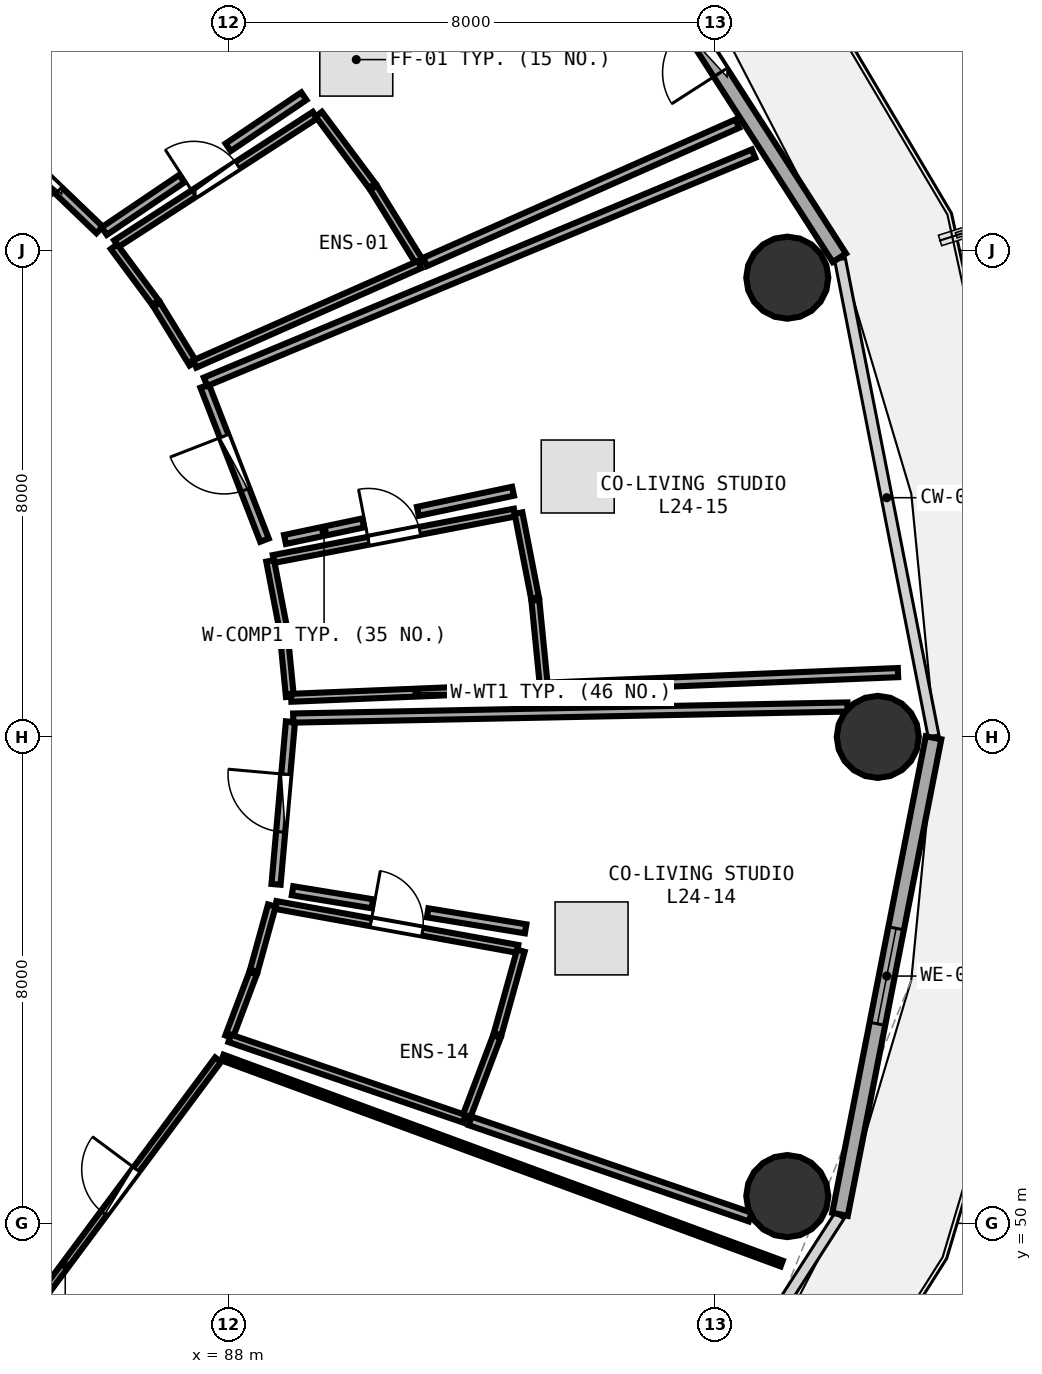
"""IFC4 building model, lengths in metres.
Left out: names, types, materials, properties, quantities, classifications, styles, units other than length and angle.
Written with IfcOpenShell. Run it as: python <this file> out.ifc"""

import sys

from ifc_helpers import new_model, si_unit, direction, frame, frame_2d, origin, origin_2d, place, context, subcontext, project, spatial, rectangle, circle, extrude, element, fill, save


model = new_model("IFC4")
c1 = context("Model", 3, precision=1e-05, world=origin(), true_north=direction((0.0, 1.0)))
c2 = subcontext(c1, "Body", "Model", "MODEL_VIEW")
j1 = project(units=[si_unit("LENGTHUNIT", "METRE"), si_unit("PLANEANGLEUNIT", "RADIAN")], contexts=[c1])
p1 = place(None, origin())
s1 = spatial("IfcSite", under=j1, at=p1, CompositionType="ELEMENT")
p2 = place(p1, origin())
s2 = spatial("IfcBuilding", under=s1, at=p2, CompositionType="ELEMENT")
p3 = place(p2, frame((0.0, 0.0, 95.1)))
s3 = spatial("IfcBuildingStorey", under=s2, at=p3, CompositionType="ELEMENT", Elevation=95.1)
for number, where, z_axis, x_axis in (
    (1, (98.68, 58.0, 0.0), (0.0, 0.0, 1.0), (1.0, 0.0, 0.0)),
    (2, (97.192, 65.552, 0.0), (0.0, 0.0, 1.0), (1.0, 0.0, 0.0)),
    (3, (97.192, 50.448, 0.0), (0.0, 0.0, 1.0), (1.0, 0.0, 0.0)),
):
    element("IfcColumn", number, at=place(p3, frame(where, z_axis=z_axis, x_axis=x_axis)), inside=s3, PredefinedType="COLUMN", context=c2, shape_type="SweptSolid", body=[
        extrude(circle(Radius=0.675, at=origin_2d()), origin(), (0.0, 0.0, 1.0), 3.75),
    ])
p4 = place(p3, frame((98.048, 65.879, 0.0), z_axis=(0.0, 0.0, 1.0), x_axis=(-0.540620528459, 0.841266571432, 0.0)))
e4 = element("IfcWall", 4, at=p4, inside=s3, PredefinedType="SOLIDWALL", context=c2, shape_type="SweptSolid", body=[
    extrude(rectangle(XDim=8.193, YDim=0.26, at=frame_2d((4.096, 0.0))), origin(), (0.0, 0.0, 1.0), 3.475),
])
p5 = place(p4, frame((3.621, 0.0, 0.0)))
e5 = element("IfcOpeningElement", 5, at=p5, cuts=e4, PredefinedType="OPENING", context=c2, shape_type="SweptSolid", body=[
    extrude(rectangle(XDim=0.95, YDim=2.1, at=frame_2d((0.475, 1.05))), frame((0.0, 0.14, 0.0), z_axis=(0.0, -1.0, 0.0), x_axis=(1.0, 0.0, 0.0)), (0.0, 0.0, 1.0), 0.28),
])
p6 = place(p4, frame((4.921, 0.0, 0.85)))
e6 = element("IfcOpeningElement", 6, at=p6, cuts=e4, PredefinedType="OPENING", context=c2, shape_type="SweptSolid", body=[
    extrude(rectangle(XDim=1.2, YDim=1.45, at=frame_2d((0.6, 0.725))), frame((0.0, 0.14, 0.0), z_axis=(0.0, -1.0, 0.0), x_axis=(1.0, 0.0, 0.0)), (0.0, 0.0, 1.0), 0.28),
])
p7 = place(p3, frame((98.059, 50.148, 0.0), z_axis=(0.0, 0.0, 1.0), x_axis=(0.192581843632, 0.981280914674, 0.0)))
e7 = element("IfcWall", 7, at=p7, inside=s3, PredefinedType="SOLIDWALL", context=c2, shape_type="SweptSolid", body=[
    extrude(rectangle(XDim=7.987, YDim=0.26, at=frame_2d((3.993, 0.0))), origin(), (0.0, 0.0, 1.0), 3.475),
])
p8 = place(p7, frame((3.193, 0.0, 0.85)))
e8 = element("IfcOpeningElement", 8, at=p8, cuts=e7, PredefinedType="OPENING", context=c2, shape_type="SweptSolid", body=[
    extrude(rectangle(XDim=1.6, YDim=1.45, at=frame_2d((0.8, 0.725))), frame((0.0, 0.14, 0.0), z_axis=(0.0, -1.0, 0.0), x_axis=(1.0, 0.0, 0.0)), (0.0, 0.0, 1.0), 0.28),
])
p9 = place(p3, frame((86.156, 66.111, 0.0), z_axis=(0.0, 0.0, 1.0), x_axis=(0.839597088747, 0.543209654339, 0.0)))
e9 = element("IfcWall", 9, at=p9, inside=s3, PredefinedType="PLUMBINGWALL", context=c2, shape_type="SweptSolid", body=[
    extrude(rectangle(XDim=3.891, YDim=0.13, at=frame_2d((1.946, 0.0))), origin(), (0.0, 0.0, 1.0), 3.175),
])
p10 = place(p9, frame((1.516, 0.0, 0.0)))
e10 = element("IfcOpeningElement", 10, at=p10, cuts=e9, PredefinedType="OPENING", context=c2, shape_type="SweptSolid", body=[
    extrude(rectangle(XDim=0.86, YDim=2.05, at=frame_2d((0.43, 1.025))), frame((0.0, 0.075, 0.0), z_axis=(0.0, -1.0, 0.0), x_axis=(1.0, 0.0, 0.0)), (0.0, 0.0, 1.0), 0.15),
])
p11 = place(p3, frame((85.882, 66.337, 0.0), z_axis=(0.0, 0.0, 1.0), x_axis=(-0.721698326825, 0.692207718144, 0.0)))
e11 = element("IfcWall", 11, at=p11, inside=s3, PredefinedType="PARTITIONING", context=c2, shape_type="SweptSolid", body=[
    extrude(rectangle(XDim=2.823, YDim=0.15, at=frame_2d((1.412, 0.0))), origin(), (0.0, 0.0, 1.0), 2.925),
])
p12 = place(p11, frame((0.936, 0.0, 0.0)))
e12 = element("IfcOpeningElement", 12, at=p12, cuts=e11, PredefinedType="OPENING", context=c2, shape_type="SweptSolid", body=[
    extrude(rectangle(XDim=0.95, YDim=2.08, at=frame_2d((0.475, 1.04))), frame((0.0, 0.085, 0.0), z_axis=(0.0, -1.0, 0.0), x_axis=(1.0, 0.0, 0.0)), (0.0, 0.0, 1.0), 0.17),
])
p13 = place(p3, frame((84.608, 48.36, 0.0), z_axis=(0.0, 0.0, 1.0), x_axis=(0.596833425992, 0.802365167251, 0.0)))
e13 = element("IfcWall", 13, at=p13, inside=s3, PredefinedType="PARTITIONING", context=c2, shape_type="SweptSolid", body=[
    extrude(rectangle(XDim=5.399, YDim=0.12, at=frame_2d((2.699, 0.0))), origin(), (0.0, 0.0, 1.0), 2.925),
])
p14 = place(p13, frame((2.249, 0.0, 0.0)))
e14 = element("IfcOpeningElement", 14, at=p14, cuts=e13, PredefinedType="OPENING", context=c2, shape_type="SweptSolid", body=[
    extrude(rectangle(XDim=0.9, YDim=2.08, at=frame_2d((0.45, 1.04))), frame((0.0, 0.07, 0.0), z_axis=(0.0, -1.0, 0.0), x_axis=(1.0, 0.0, 0.0)), (0.0, 0.0, 1.0), 0.14),
])
p15 = place(p3, frame((88.779, 55.235, 0.0), z_axis=(0.0, 0.0, 1.0), x_axis=(0.983931701878, -0.178545249279, 0.0)))
e15 = element("IfcWall", 15, at=p15, inside=s3, PredefinedType="PLUMBINGWALL", context=c2, shape_type="SweptSolid", body=[
    extrude(rectangle(XDim=4.042, YDim=0.13, at=frame_2d((2.021, 0.0))), origin(), (0.0, 0.0, 1.0), 3.175),
])
p16 = place(p15, frame((1.591, 0.0, 0.0)))
e16 = element("IfcOpeningElement", 16, at=p16, cuts=e15, PredefinedType="OPENING", context=c2, shape_type="SweptSolid", body=[
    extrude(rectangle(XDim=0.86, YDim=2.05, at=frame_2d((0.43, 1.025))), frame((0.0, 0.075, 0.0), z_axis=(0.0, -1.0, 0.0), x_axis=(1.0, 0.0, 0.0)), (0.0, 0.0, 1.0), 0.15),
])
p17 = place(p3, frame((88.783, 55.575, 0.0), z_axis=(0.0, 0.0, 1.0), x_axis=(0.088469625327, 0.996078875087, 0.0)))
e17 = element("IfcWall", 17, at=p17, inside=s3, PredefinedType="PARTITIONING", context=c2, shape_type="SweptSolid", body=[
    extrude(rectangle(XDim=2.685, YDim=0.15, at=frame_2d((1.343, 0.0))), origin(), (0.0, 0.0, 1.0), 2.925),
])
p18 = place(p17, frame((0.867, 0.0, 0.0)))
e18 = element("IfcOpeningElement", 18, at=p18, cuts=e17, PredefinedType="OPENING", context=c2, shape_type="SweptSolid", body=[
    extrude(rectangle(XDim=0.95, YDim=2.08, at=frame_2d((0.475, 1.04))), frame((0.0, 0.085, 0.0), z_axis=(0.0, -1.0, 0.0), x_axis=(1.0, 0.0, 0.0)), (0.0, 0.0, 1.0), 0.17),
])
p19 = place(p3, frame((88.742, 60.925, 0.0), z_axis=(0.0, 0.0, 1.0), x_axis=(0.981973232987, 0.189020024595, 0.0)))
e19 = element("IfcWall", 19, at=p19, inside=s3, PredefinedType="PLUMBINGWALL", context=c2, shape_type="SweptSolid", body=[
    extrude(rectangle(XDim=4.039, YDim=0.13, at=frame_2d((2.02, 0.0))), origin(), (0.0, 0.0, 1.0), 3.175),
])
p20 = place(p19, frame((1.59, 0.0, 0.0)))
e20 = element("IfcOpeningElement", 20, at=p20, cuts=e19, PredefinedType="OPENING", context=c2, shape_type="SweptSolid", body=[
    extrude(rectangle(XDim=0.86, YDim=2.05, at=frame_2d((0.43, 1.025))), frame((0.0, 0.075, 0.0), z_axis=(0.0, -1.0, 0.0), x_axis=(1.0, 0.0, 0.0)), (0.0, 0.0, 1.0), 0.15),
])
p21 = place(p3, frame((88.593, 61.236, 0.0), z_axis=(0.0, 0.0, 1.0), x_axis=(-0.361969309841, 0.93219001214, 0.0)))
e21 = element("IfcWall", 21, at=p21, inside=s3, PredefinedType="PARTITIONING", context=c2, shape_type="SweptSolid", body=[
    extrude(rectangle(XDim=2.718, YDim=0.15, at=frame_2d((1.359, 0.0))), origin(), (0.0, 0.0, 1.0), 3.235),
])
p22 = place(p21, frame((0.884, 0.0, 0.0)))
e22 = element("IfcOpeningElement", 22, at=p22, cuts=e21, PredefinedType="OPENING", context=c2, shape_type="SweptSolid", body=[
    extrude(rectangle(XDim=0.95, YDim=2.08, at=frame_2d((0.475, 1.04))), frame((0.0, 0.085, 0.0), z_axis=(0.0, -1.0, 0.0), x_axis=(1.0, 0.0, 0.0)), (0.0, 0.0, 1.0), 0.17),
])
p23 = place(p3, frame((87.417, 64.141, 0.0), z_axis=(0.0, 0.0, 1.0), x_axis=(-0.52310141153, 0.852270446077, 0.0)))
e23 = element("IfcWall", 23, at=p23, inside=s3, PredefinedType="PLUMBINGWALL", context=c2, shape_type="SweptSolid", body=[
    extrude(rectangle(XDim=1.135, YDim=0.13, at=frame_2d((0.568, 0.0))), origin(), (0.0, 0.0, 1.0), 2.925),
])
p24 = place(p3, frame((86.8, 65.142, 0.0), z_axis=(0.0, 0.0, 1.0), x_axis=(-0.595625136946, 0.803262532574, 0.0)))
e24 = element("IfcWall", 24, at=p24, inside=s3, PredefinedType="PLUMBINGWALL", context=c2, shape_type="SweptSolid", body=[
    extrude(rectangle(XDim=1.145, YDim=0.13, at=frame_2d((0.573, 0.0))), origin(), (0.0, 0.0, 1.0), 2.925),
])
p25 = place(p3, frame((89.486, 68.241, 0.0), z_axis=(0.0, 0.0, 1.0), x_axis=(0.598215175904, -0.801335512328, 0.0)))
e25 = element("IfcWall", 25, at=p25, inside=s3, PredefinedType="PLUMBINGWALL", context=c2, shape_type="SweptSolid", body=[
    extrude(rectangle(XDim=1.468, YDim=0.13, at=frame_2d((0.734, 0.0))), origin(), (0.0, 0.0, 1.0), 3.48),
])
p26 = place(p3, frame((90.386, 67.032, 0.0), z_axis=(0.0, 0.0, 1.0), x_axis=(0.525910281035, -0.850540049793, 0.0)))
e26 = element("IfcWall", 26, at=p26, inside=s3, PredefinedType="PLUMBINGWALL", context=c2, shape_type="SweptSolid", body=[
    extrude(rectangle(XDim=1.457, YDim=0.13, at=frame_2d((0.729, 0.0))), origin(), (0.0, 0.0, 1.0), 3.48),
])
p27 = place(p3, frame((91.145, 65.768, 0.0), z_axis=(0.0, 0.0, 1.0), x_axis=(-0.914586427441, -0.404390487946, 0.0)))
e27 = element("IfcWall", 27, at=p27, inside=s3, PredefinedType="PLUMBINGWALL", context=c2, shape_type="SweptSolid", body=[
    extrude(rectangle(XDim=4.045, YDim=0.13, at=frame_2d((2.022, 0.0))), origin(), (0.0, 0.0, 1.0), 2.925),
])
p28 = place(p3, frame((83.829, 68.362, 0.0), z_axis=(0.0, 0.0, 1.0), x_axis=(0.698749209364, 0.715366718833, 0.0)))
e28 = element("IfcWall", 28, at=p28, inside=s3, PredefinedType="PARTITIONING", context=c2, shape_type="SweptSolid", body=[
    extrude(rectangle(XDim=9.3, YDim=0.15, at=frame_2d((4.65, 0.0))), origin(), (0.0, 0.0, 1.0), 2.975),
])
p29 = place(p3, frame((96.369, 68.085, 0.0), z_axis=(0.0, 0.0, 1.0), x_axis=(-0.914319955381, -0.404992616219, 0.0)))
e29 = element("IfcWall", 29, at=p29, inside=s3, PredefinedType="PARTITIONING", context=c2, shape_type="SweptSolid", body=[
    extrude(rectangle(XDim=5.616, YDim=0.15, at=frame_2d((2.808, 0.0))), origin(), (0.0, 0.0, 1.0), 2.975),
])
p30 = place(p3, frame((89.241, 68.537, 0.0), z_axis=(0.0, 0.0, 1.0), x_axis=(-0.828582854192, -0.559866460631, 0.0)))
e30 = element("IfcWall", 30, at=p30, inside=s3, PredefinedType="PARTITIONING", context=c2, shape_type="SweptSolid", body=[
    extrude(rectangle(XDim=1.502, YDim=0.15, at=frame_2d((0.751, 0.0))), origin(), (0.0, 0.0, 1.0), 3.175),
])
p31 = place(p3, frame((87.234, 67.181, 0.0), z_axis=(0.0, 0.0, 1.0), x_axis=(-0.828521381114, -0.559957427879, 0.0)))
e31 = element("IfcWall", 31, at=p31, inside=s3, PredefinedType="PARTITIONING", context=c2, shape_type="SweptSolid", body=[
    extrude(rectangle(XDim=1.54, YDim=0.15, at=frame_2d((0.77, 0.0))), origin(), (0.0, 0.0, 1.0), 3.235),
])
p32 = place(p3, frame((86.154, 71.378, 0.0), z_axis=(0.0, 0.0, 1.0), x_axis=(-0.681137169266, -0.732155828116, 0.0)))
e32 = element("IfcWall", 32, at=p32, inside=s3, PredefinedType="PLUMBINGWALL", context=c2, shape_type="SweptSolid", body=[
    extrude(rectangle(XDim=3.847, YDim=0.13, at=frame_2d((1.924, 0.0))), origin(), (0.0, 0.0, 1.0), 3.175),
])
p33 = place(p3, frame((87.904, 52.726, 0.0), z_axis=(0.0, 0.0, 1.0), x_axis=(0.938361829853, -0.345654562063, 0.0)))
e33 = element("IfcWall", 33, at=p33, inside=s3, PredefinedType="PARTITIONING", context=c2, shape_type="SweptSolid", body=[
    extrude(rectangle(XDim=9.8, YDim=0.1, at=frame_2d((4.9, 0.0))), origin(), (0.0, 0.0, 1.0), 2.925),
])
p34 = place(p3, frame((88.01, 53.068, 0.0), z_axis=(0.0, 0.0, 1.0), x_axis=(0.353582849957, 0.93540321157, 0.0)))
e34 = element("IfcWall", 34, at=p34, inside=s3, PredefinedType="PLUMBINGWALL", context=c2, shape_type="SweptSolid", body=[
    extrude(rectangle(XDim=1.12, YDim=0.13, at=frame_2d((0.56, 0.0))), origin(), (0.0, 0.0, 1.0), 3.235),
])
p35 = place(p3, frame((88.418, 54.153, 0.0), z_axis=(0.0, 0.0, 1.0), x_axis=(0.266139738922, 0.963934458024, 0.0)))
e35 = element("IfcWall", 35, at=p35, inside=s3, PredefinedType="PLUMBINGWALL", context=c2, shape_type="SweptSolid", body=[
    extrude(rectangle(XDim=1.114, YDim=0.13, at=frame_2d((0.557, 0.0))), origin(), (0.0, 0.0, 1.0), 3.48),
])
p36 = place(p3, frame((92.81, 54.484, 0.0), z_axis=(0.0, 0.0, 1.0), x_axis=(-0.268041350083, -0.963407408445, 0.0)))
e36 = element("IfcWall", 36, at=p36, inside=s3, PredefinedType="PLUMBINGWALL", context=c2, shape_type="SweptSolid", body=[
    extrude(rectangle(XDim=1.426, YDim=0.13, at=frame_2d((0.713, 0.0))), origin(), (0.0, 0.0, 1.0), 3.48),
])
p37 = place(p3, frame((92.415, 53.072, 0.0), z_axis=(0.0, 0.0, 1.0), x_axis=(-0.354833873896, -0.934929367351, 0.0)))
e37 = element("IfcWall", 37, at=p37, inside=s3, PredefinedType="PLUMBINGWALL", context=c2, shape_type="SweptSolid", body=[
    extrude(rectangle(XDim=1.434, YDim=0.13, at=frame_2d((0.717, 0.0))), origin(), (0.0, 0.0, 1.0), 3.48),
])
p38 = place(p3, frame((91.88, 51.719, 0.0), z_axis=(0.0, 0.0, 1.0), x_axis=(-0.945930729077, 0.324368703466, 0.0)))
e38 = element("IfcWall", 38, at=p38, inside=s3, PredefinedType="PLUMBINGWALL", context=c2, shape_type="SweptSolid", body=[
    extrude(rectangle(XDim=4.079, YDim=0.13, at=frame_2d((2.039, 0.0))), origin(), (0.0, 0.0, 1.0), 3.175),
])
p39 = place(p3, frame((89.066, 58.31, 0.0), z_axis=(0.0, 0.0, 1.0), x_axis=(0.999799952906, 0.020001354173, 0.0)))
e39 = element("IfcWall", 39, at=p39, inside=s3, PredefinedType="PARTITIONING", context=c2, shape_type="SweptSolid", body=[
    extrude(rectangle(XDim=9.118, YDim=0.15, at=frame_2d((4.559, 0.0))), origin(), (0.0, 0.0, 1.0), 3.175),
])
p40 = place(p3, frame((96.583, 50.104, 0.0), z_axis=(0.0, 0.0, 1.0), x_axis=(-0.945793886269, 0.324767493288, 0.0)))
e40 = element("IfcWall", 40, at=p40, inside=s3, PredefinedType="PARTITIONING", context=c2, shape_type="SweptSolid", body=[
    extrude(rectangle(XDim=4.873, YDim=0.15, at=frame_2d((2.437, 0.0))), origin(), (0.0, 0.0, 1.0), 2.925),
])
p41 = place(p3, frame((92.888, 54.844, 0.0), z_axis=(0.0, 0.0, 1.0), x_axis=(-0.986922201966, 0.161197292988, 0.0)))
e41 = element("IfcWall", 41, at=p41, inside=s3, PredefinedType="PARTITIONING", context=c2, shape_type="SweptSolid", body=[
    extrude(rectangle(XDim=1.633, YDim=0.15, at=frame_2d((0.816, 0.0))), origin(), (0.0, 0.0, 1.0), 3.175),
])
p42 = place(p3, frame((90.369, 55.255, 0.0), z_axis=(0.0, 0.0, 1.0), x_axis=(-0.986928715278, 0.161157410501, 0.0)))
e42 = element("IfcWall", 42, at=p42, inside=s3, PredefinedType="PARTITIONING", context=c2, shape_type="SweptSolid", body=[
    extrude(rectangle(XDim=1.332, YDim=0.15, at=frame_2d((0.666, 0.0))), origin(), (0.0, 0.0, 1.0), 3.48),
])
p43 = place(p3, frame((89.011, 58.662, 0.0), z_axis=(0.0, 0.0, 1.0), x_axis=(-0.097430149617, 0.995242365429, 0.0)))
e43 = element("IfcWall", 43, at=p43, inside=s3, PredefinedType="PLUMBINGWALL", context=c2, shape_type="SweptSolid", body=[
    extrude(rectangle(XDim=1.108, YDim=0.13, at=frame_2d((0.554, 0.0))), origin(), (0.0, 0.0, 1.0), 3.48),
])
p44 = place(p3, frame((88.897, 59.804, 0.0), z_axis=(0.0, 0.0, 1.0), x_axis=(-0.18947511119, 0.981885523999, 0.0)))
e44 = element("IfcWall", 44, at=p44, inside=s3, PredefinedType="PLUMBINGWALL", context=c2, shape_type="SweptSolid", body=[
    extrude(rectangle(XDim=1.111, YDim=0.13, at=frame_2d((0.555, 0.0))), origin(), (0.0, 0.0, 1.0), 3.48),
])
p45 = place(p3, frame((92.771, 61.68, 0.0), z_axis=(0.0, 0.0, 1.0), x_axis=(0.191058204905, -0.981578709192, 0.0)))
e45 = element("IfcWall", 45, at=p45, inside=s3, PredefinedType="PLUMBINGWALL", context=c2, shape_type="SweptSolid", body=[
    extrude(rectangle(XDim=1.421, YDim=0.13, at=frame_2d((0.71, 0.0))), origin(), (0.0, 0.0, 1.0), 3.48),
])
p46 = place(p3, frame((93.048, 60.246, 0.0), z_axis=(0.0, 0.0, 1.0), x_axis=(0.098651373381, -0.995122056097, 0.0)))
e46 = element("IfcWall", 46, at=p46, inside=s3, PredefinedType="PLUMBINGWALL", context=c2, shape_type="SweptSolid", body=[
    extrude(rectangle(XDim=1.418, YDim=0.13, at=frame_2d((0.709, 0.0))), origin(), (0.0, 0.0, 1.0), 3.48),
])
p47 = place(p3, frame((93.17, 58.814, 0.0), z_axis=(0.0, 0.0, 1.0), x_axis=(-0.999142957242, -0.041392644201, 0.0)))
e47 = element("IfcWall", 47, at=p47, inside=s3, PredefinedType="PLUMBINGWALL", context=c2, shape_type="SweptSolid", body=[
    extrude(rectangle(XDim=4.141, YDim=0.13, at=frame_2d((2.07, 0.0))), origin(), (0.0, 0.0, 1.0), 3.175),
])
p48 = place(p3, frame((87.625, 63.84, 0.0), z_axis=(0.0, 0.0, 1.0), x_axis=(0.92321744991, 0.384277946521, 0.0)))
e48 = element("IfcWall", 48, at=p48, inside=s3, PredefinedType="PARTITIONING", context=c2, shape_type="SweptSolid", body=[
    extrude(rectangle(XDim=9.762, YDim=0.15, at=frame_2d((4.881, 0.0))), origin(), (0.0, 0.0, 1.0), 2.925),
])
p49 = place(p3, frame((99.012, 59.057, 0.0), z_axis=(0.0, 0.0, 1.0), x_axis=(-0.999136530054, -0.041547494638, 0.0)))
e49 = element("IfcWall", 49, at=p49, inside=s3, PredefinedType="PARTITIONING", context=c2, shape_type="SweptSolid", body=[
    extrude(rectangle(XDim=5.747, YDim=0.15, at=frame_2d((2.874, 0.0))), origin(), (0.0, 0.0, 1.0), 2.975),
])
p50 = place(p3, frame((92.681, 62.04, 0.0), z_axis=(0.0, 0.0, 1.0), x_axis=(-0.978359809994, -0.206910807327, 0.0)))
e50 = element("IfcWall", 50, at=p50, inside=s3, PredefinedType="PARTITIONING", context=c2, shape_type="SweptSolid", body=[
    extrude(rectangle(XDim=1.599, YDim=0.15, at=frame_2d((0.799, 0.0))), origin(), (0.0, 0.0, 1.0), 3.175),
])
p51 = place(p3, frame((90.216, 61.519, 0.0), z_axis=(0.0, 0.0, 1.0), x_axis=(-0.978356212177, -0.206927818562, 0.0)))
e51 = element("IfcWall", 51, at=p51, inside=s3, PredefinedType="PARTITIONING", context=c2, shape_type="SweptSolid", body=[
    extrude(rectangle(XDim=1.314, YDim=0.15, at=frame_2d((0.657, 0.0))), origin(), (0.0, 0.0, 1.0), 3.48),
])
p52 = place(p5, frame((0.95, 0.0, 0.0), z_axis=(0.0, 0.0, 1.0), x_axis=(-1.0, 0.0, 0.0)))
e52 = element("IfcDoor", 52, at=p52, inside=s3, OperationType="SINGLE_SWING_RIGHT", PredefinedType="DOOR", context=c2, shape_type="SweptSolid", body=[
    extrude(rectangle(XDim=0.95, YDim=2.1, at=frame_2d((0.475, 1.05))), frame((0.0, 0.025, 0.0), z_axis=(0.0, -1.0, 0.0), x_axis=(1.0, 0.0, 0.0)), (0.0, 0.0, 1.0), 0.05),
])
fill(e5, e52)
p53 = place(p8, origin())
e53 = element("IfcWindow", 53, at=p53, inside=s3, PartitioningType="SINGLE_PANEL", PredefinedType="WINDOW", context=c2, shape_type="SweptSolid", body=[
    extrude(rectangle(XDim=1.6, YDim=1.45, at=frame_2d((0.8, 0.725))), frame((0.0, 0.03, 0.0), z_axis=(0.0, -1.0, 0.0), x_axis=(1.0, 0.0, 0.0)), (0.0, 0.0, 1.0), 0.06),
])
fill(e8, e53)
p54 = place(p10, origin())
e54 = element("IfcDoor", 54, at=p54, inside=s3, OperationType="SINGLE_SWING_LEFT", PredefinedType="DOOR", context=c2, shape_type="SweptSolid", body=[
    extrude(rectangle(XDim=0.86, YDim=2.05, at=frame_2d((0.43, 1.025))), frame((0.0, 0.025, 0.0), z_axis=(0.0, -1.0, 0.0), x_axis=(1.0, 0.0, 0.0)), (0.0, 0.0, 1.0), 0.05),
])
fill(e10, e54)
p55 = place(p12, origin())
e55 = element("IfcDoor", 55, at=p55, inside=s3, OperationType="SINGLE_SWING_RIGHT", PredefinedType="DOOR", context=c2, shape_type="SweptSolid", body=[
    extrude(rectangle(XDim=0.95, YDim=2.08, at=frame_2d((0.475, 1.04))), frame((0.0, 0.025, 0.0), z_axis=(0.0, -1.0, 0.0), x_axis=(1.0, 0.0, 0.0)), (0.0, 0.0, 1.0), 0.05),
])
fill(e12, e55)
p56 = place(p14, origin())
e56 = element("IfcDoor", 56, at=p56, inside=s3, OperationType="SINGLE_SWING_RIGHT", PredefinedType="DOOR", context=c2, shape_type="SweptSolid", body=[
    extrude(rectangle(XDim=0.9, YDim=2.08, at=frame_2d((0.45, 1.04))), frame((0.0, 0.025, 0.0), z_axis=(0.0, -1.0, 0.0), x_axis=(1.0, 0.0, 0.0)), (0.0, 0.0, 1.0), 0.05),
])
fill(e14, e56)
p57 = place(p16, origin())
e57 = element("IfcDoor", 57, at=p57, inside=s3, OperationType="SINGLE_SWING_LEFT", PredefinedType="DOOR", context=c2, shape_type="SweptSolid", body=[
    extrude(rectangle(XDim=0.86, YDim=2.05, at=frame_2d((0.43, 1.025))), frame((0.0, 0.025, 0.0), z_axis=(0.0, -1.0, 0.0), x_axis=(1.0, 0.0, 0.0)), (0.0, 0.0, 1.0), 0.05),
])
fill(e16, e57)
p58 = place(p18, origin())
e58 = element("IfcDoor", 58, at=p58, inside=s3, OperationType="SINGLE_SWING_RIGHT", PredefinedType="DOOR", context=c2, shape_type="SweptSolid", body=[
    extrude(rectangle(XDim=0.95, YDim=2.08, at=frame_2d((0.475, 1.04))), frame((0.0, 0.025, 0.0), z_axis=(0.0, -1.0, 0.0), x_axis=(1.0, 0.0, 0.0)), (0.0, 0.0, 1.0), 0.05),
])
fill(e18, e58)
p59 = place(p20, origin())
e59 = element("IfcDoor", 59, at=p59, inside=s3, OperationType="SINGLE_SWING_LEFT", PredefinedType="DOOR", context=c2, shape_type="SweptSolid", body=[
    extrude(rectangle(XDim=0.86, YDim=2.05, at=frame_2d((0.43, 1.025))), frame((0.0, 0.025, 0.0), z_axis=(0.0, -1.0, 0.0), x_axis=(1.0, 0.0, 0.0)), (0.0, 0.0, 1.0), 0.05),
])
fill(e20, e59)
p60 = place(p22, origin())
e60 = element("IfcDoor", 60, at=p60, inside=s3, OperationType="SINGLE_SWING_RIGHT", PredefinedType="DOOR", context=c2, shape_type="SweptSolid", body=[
    extrude(rectangle(XDim=0.95, YDim=2.08, at=frame_2d((0.475, 1.04))), frame((0.0, 0.025, 0.0), z_axis=(0.0, -1.0, 0.0), x_axis=(1.0, 0.0, 0.0)), (0.0, 0.0, 1.0), 0.05),
])
fill(e22, e60)
save(model, sys.argv[1])
